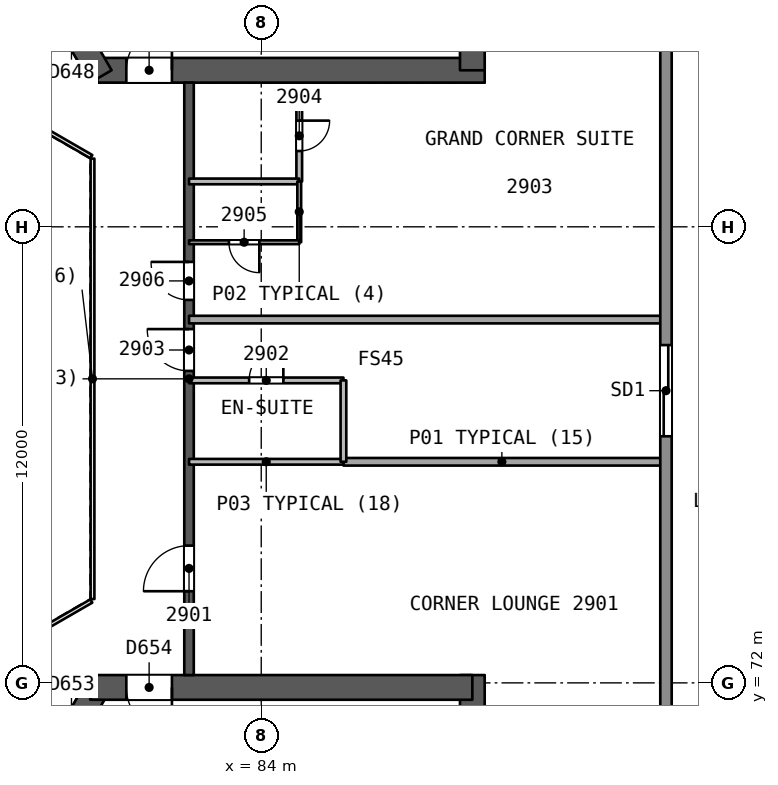
"""IFC4 building model, lengths in metres.
Left out: names, types, materials, properties, quantities, classifications, styles, units other than length and angle.
Written with IfcOpenShell. Run it as: python <this file> out.ifc"""

import sys

from ifc_helpers import new_model, si_unit, direction, frame, frame_2d, origin, place, context, subcontext, project, spatial, rectangle, extrude, element, fill, save


model = new_model("IFC4")
c1 = context("Model", 3, precision=1e-05, world=origin(), true_north=direction((0.0, 1.0)))
c2 = subcontext(c1, "Body", "Model", "MODEL_VIEW")
j1 = project(units=[si_unit("LENGTHUNIT", "METRE"), si_unit("PLANEANGLEUNIT", "RADIAN")], contexts=[c1])
p1 = place(None, origin())
s1 = spatial("IfcSite", under=j1, at=p1, CompositionType="ELEMENT")
p2 = place(p1, origin())
s2 = spatial("IfcBuilding", under=s1, at=p2, CompositionType="ELEMENT")
p3 = place(p2, frame((0.0, 0.0, 121.6)))
s3 = spatial("IfcBuildingStorey", under=s2, at=p3, CompositionType="ELEMENT", Elevation=121.6)
p4 = place(p3, frame((79.688, 88.119, 0.0), z_axis=(0.0, 0.0, 1.0), x_axis=(1.0, 0.0, 0.0)))
e1 = element("IfcWall", 1, at=p4, inside=s3, PredefinedType="SHEAR", context=c2, shape_type="SweptSolid", body=[
    extrude(rectangle(XDim=10.192, YDim=0.65, at=frame_2d((5.096, 0.0))), origin(), (0.0, 0.0, 1.0), 3.7),
])
p5 = place(p4, frame((0.762, 0.0, 0.0)))
e2 = element("IfcOpeningElement", 2, at=p5, cuts=e1, PredefinedType="OPENING", context=c2, shape_type="SweptSolid", body=[
    extrude(rectangle(XDim=1.2, YDim=2.1, at=frame_2d((0.6, 1.05))), frame((0.0, 0.335, 0.0), z_axis=(0.0, -1.0, 0.0), x_axis=(1.0, 0.0, 0.0)), (0.0, 0.0, 1.0), 0.671),
])
p6 = place(p3, frame((89.555, 88.119, 0.0), z_axis=(0.0, 0.0, 1.0), x_axis=(0.0, 1.0, 0.0)))
e3 = element("IfcWall", 3, at=p6, inside=s3, PredefinedType="SHEAR", context=c2, shape_type="SweptSolid", body=[
    extrude(rectangle(XDim=14.009, YDim=0.65, at=frame_2d((7.004, 0.0))), origin(), (0.0, 0.0, 1.0), 3.7),
])
p7 = place(p3, frame((74.754, 96.665, 0.0), z_axis=(0.0, 0.0, 1.0), x_axis=(0.500011799426, -0.866018591275, 0.0)))
e4 = element("IfcWall", 4, at=p7, inside=s3, PredefinedType="SHEAR", context=c2, shape_type="SweptSolid", body=[
    extrude(rectangle(XDim=10.055, YDim=0.65, at=frame_2d((5.027, 0.0))), origin(), (0.0, 0.0, 1.0), 3.7),
])
p8 = place(p7, frame((7.905, 0.0, 0.0)))
e5 = element("IfcOpeningElement", 5, at=p8, cuts=e4, PredefinedType="OPENING", context=c2, shape_type="SweptSolid", body=[
    extrude(rectangle(XDim=1.2, YDim=2.1, at=frame_2d((0.6, 1.05))), frame((0.0, 0.335, 0.0), z_axis=(0.0, -1.0, 0.0), x_axis=(1.0, 0.0, 0.0)), (0.0, 0.0, 1.0), 0.671),
])
p9 = place(p3, frame((79.688, 71.881, 0.0), z_axis=(0.0, 0.0, 1.0), x_axis=(-0.49999822179, -0.866026430432, 0.0)))
e6 = element("IfcWall", 6, at=p9, inside=s3, PredefinedType="SHEAR", context=c2, shape_type="SweptSolid", body=[
    extrude(rectangle(XDim=10.192, YDim=0.65, at=frame_2d((5.096, 0.0))), origin(), (0.0, 0.0, 1.0), 3.7),
])
p10 = place(p9, frame((0.762, 0.0, 0.0)))
e7 = element("IfcOpeningElement", 7, at=p10, cuts=e6, PredefinedType="OPENING", context=c2, shape_type="SweptSolid", body=[
    extrude(rectangle(XDim=1.2, YDim=2.1, at=frame_2d((0.6, 1.05))), frame((0.0, 0.335, 0.0), z_axis=(0.0, -1.0, 0.0), x_axis=(1.0, 0.0, 0.0)), (0.0, 0.0, 1.0), 0.671),
])
p11 = place(p3, frame((89.555, 58.06, 0.0), z_axis=(0.0, 0.0, 1.0), x_axis=(0.0, 1.0, 0.0)))
e8 = element("IfcWall", 8, at=p11, inside=s3, PredefinedType="SHEAR", context=c2, shape_type="SweptSolid", body=[
    extrude(rectangle(XDim=14.146, YDim=0.65, at=frame_2d((7.073, 0.0))), origin(), (0.0, 0.0, 1.0), 3.7),
])
p12 = place(p3, frame((89.555, 71.881, 0.0), z_axis=(0.0, 0.0, 1.0), x_axis=(-1.0, 0.0, 0.0)))
e9 = element("IfcWall", 9, at=p12, inside=s3, PredefinedType="SHEAR", context=c2, shape_type="SweptSolid", body=[
    extrude(rectangle(XDim=10.055, YDim=0.65, at=frame_2d((5.027, 0.0))), origin(), (0.0, 0.0, 1.0), 3.7),
])
p13 = place(p12, frame((7.905, 0.0, 0.0)))
e10 = element("IfcOpeningElement", 10, at=p13, cuts=e9, PredefinedType="OPENING", context=c2, shape_type="SweptSolid", body=[
    extrude(rectangle(XDim=1.2, YDim=2.1, at=frame_2d((0.6, 1.05))), frame((0.0, 0.335, 0.0), z_axis=(0.0, -1.0, 0.0), x_axis=(1.0, 0.0, 0.0)), (0.0, 0.0, 1.0), 0.671),
])
p14 = place(p3, frame((82.1, 72.206, 0.0), z_axis=(0.0, 0.0, 1.0), x_axis=(0.0, 1.0, 0.0)))
e11 = element("IfcWall", 11, at=p14, inside=s3, PredefinedType="SHEAR", context=c2, shape_type="SweptSolid", body=[
    extrude(rectangle(XDim=15.588, YDim=0.25, at=frame_2d((7.794, 0.0))), origin(), (0.0, 0.0, 1.0), 3.25),
])
p15 = place(p14, frame((2.206, 0.0, 0.0)))
e12 = element("IfcOpeningElement", 12, at=p15, cuts=e11, PredefinedType="OPENING", context=c2, shape_type="SweptSolid", body=[
    extrude(rectangle(XDim=1.2, YDim=2.4, at=frame_2d((0.6, 1.2))), frame((0.0, 0.135, 0.0), z_axis=(0.0, -1.0, 0.0), x_axis=(1.0, 0.0, 0.0)), (0.0, 0.0, 1.0), 0.271),
])
p16 = place(p14, frame((8.003, 0.0, 0.0)))
e13 = element("IfcOpeningElement", 13, at=p16, cuts=e11, PredefinedType="OPENING", context=c2, shape_type="SweptSolid", body=[
    extrude(rectangle(XDim=1.1, YDim=2.1, at=frame_2d((0.55, 1.05))), frame((0.0, 0.135, 0.0), z_axis=(0.0, -1.0, 0.0), x_axis=(1.0, 0.0, 0.0)), (0.0, 0.0, 1.0), 0.271),
])
p17 = place(p14, frame((9.871, 0.0, 0.0)))
e14 = element("IfcOpeningElement", 14, at=p17, cuts=e11, PredefinedType="OPENING", context=c2, shape_type="SweptSolid", body=[
    extrude(rectangle(XDim=1.0, YDim=2.1, at=frame_2d((0.5, 1.05))), frame((0.0, 0.135, 0.0), z_axis=(0.0, -1.0, 0.0), x_axis=(1.0, 0.0, 0.0)), (0.0, 0.0, 1.0), 0.271),
])
p18 = place(p3, frame((94.502, 77.818, 0.0), z_axis=(0.0, 0.0, 1.0), x_axis=(-1.0, 0.0, 0.0)))
e15 = element("IfcWall", 15, at=p18, inside=s3, PredefinedType="PARTITIONING", context=c2, shape_type="SweptSolid", body=[
    extrude(rectangle(XDim=8.339, YDim=0.2, at=frame_2d((4.169, 0.0))), origin(), (0.0, 0.0, 1.0), 3.25),
])
p19 = place(p3, frame((86.163, 77.818, 0.0), z_axis=(0.0, 0.0, 1.0), x_axis=(-1.0, 0.0, 0.0)))
e16 = element("IfcWall", 16, at=p19, inside=s3, PredefinedType="PARTITIONING", context=c2, shape_type="SweptSolid", body=[
    extrude(rectangle(XDim=4.063, YDim=0.15, at=frame_2d((2.031, 0.0))), origin(), (0.0, 0.0, 1.0), 3.25),
])
p20 = place(p3, frame((82.1, 79.959, 0.0), z_axis=(0.0, 0.0, 1.0), x_axis=(1.0, 0.0, 0.0)))
e17 = element("IfcWall", 17, at=p20, inside=s3, PredefinedType="PARTITIONING", context=c2, shape_type="SweptSolid", body=[
    extrude(rectangle(XDim=4.063, YDim=0.15, at=frame_2d((2.031, 0.0))), origin(), (0.0, 0.0, 1.0), 3.25),
])
p21 = place(p20, frame((1.582, 0.0, 0.0)))
e18 = element("IfcOpeningElement", 18, at=p21, cuts=e17, PredefinedType="OPENING", context=c2, shape_type="SweptSolid", body=[
    extrude(rectangle(XDim=0.9, YDim=2.1, at=frame_2d((0.45, 1.05))), frame((0.0, 0.085, 0.0), z_axis=(0.0, -1.0, 0.0), x_axis=(1.0, 0.0, 0.0)), (0.0, 0.0, 1.0), 0.171),
])
p22 = place(p3, frame((86.163, 79.959, 0.0), z_axis=(0.0, 0.0, 1.0), x_axis=(0.0, -1.0, 0.0)))
e19 = element("IfcWall", 19, at=p22, inside=s3, PredefinedType="PARTITIONING", context=c2, shape_type="SweptSolid", body=[
    extrude(rectangle(XDim=2.141, YDim=0.15, at=frame_2d((1.071, 0.0))), origin(), (0.0, 0.0, 1.0), 3.25),
])
p23 = place(p3, frame((94.502, 81.559, 0.0), z_axis=(0.0, 0.0, 1.0), x_axis=(-1.0, 0.0, 0.0)))
e20 = element("IfcWall", 20, at=p23, inside=s3, PredefinedType="PARTITIONING", context=c2, shape_type="SweptSolid", body=[
    extrude(rectangle(XDim=12.402, YDim=0.2, at=frame_2d((6.201, 0.0))), origin(), (0.0, 0.0, 1.0), 3.25),
])
p24 = place(p3, frame((85.0, 87.595, 0.0), z_axis=(0.0, 0.0, 1.0), x_axis=(0.0, -1.0, 0.0)))
e21 = element("IfcWall", 21, at=p24, inside=s3, PredefinedType="PARTITIONING", context=c2, shape_type="SweptSolid", body=[
    extrude(rectangle(XDim=2.401, YDim=0.15, at=frame_2d((1.2, 0.0))), origin(), (0.0, 0.0, 1.0), 3.25),
])
p25 = place(p24, frame((0.801, 0.0, 0.0)))
e22 = element("IfcOpeningElement", 22, at=p25, cuts=e21, PredefinedType="OPENING", context=c2, shape_type="SweptSolid", body=[
    extrude(rectangle(XDim=0.8, YDim=2.1, at=frame_2d((0.4, 1.05))), frame((0.0, 0.085, 0.0), z_axis=(0.0, -1.0, 0.0), x_axis=(1.0, 0.0, 0.0)), (0.0, 0.0, 1.0), 0.171),
])
p26 = place(p3, frame((85.0, 85.194, 0.0), z_axis=(0.0, 0.0, 1.0), x_axis=(0.0, -1.0, 0.0)))
e23 = element("IfcWall", 23, at=p26, inside=s3, PredefinedType="PARTITIONING", context=c2, shape_type="SweptSolid", body=[
    extrude(rectangle(XDim=1.6, YDim=0.1, at=frame_2d((0.8, 0.0))), origin(), (0.0, 0.0, 1.0), 3.25),
])
p27 = place(p3, frame((85.0, 83.594, 0.0), z_axis=(0.0, 0.0, 1.0), x_axis=(-1.0, 0.0, 0.0)))
e24 = element("IfcWall", 24, at=p27, inside=s3, PredefinedType="PARTITIONING", context=c2, shape_type="SweptSolid", body=[
    extrude(rectangle(XDim=2.9, YDim=0.1, at=frame_2d((1.45, 0.0))), origin(), (0.0, 0.0, 1.0), 3.25),
])
p28 = place(p27, frame((1.05, 0.0, 0.0)))
e25 = element("IfcOpeningElement", 25, at=p28, cuts=e24, PredefinedType="OPENING", context=c2, shape_type="SweptSolid", body=[
    extrude(rectangle(XDim=0.8, YDim=2.1, at=frame_2d((0.4, 1.05))), frame((0.0, 0.061, 0.0), z_axis=(0.0, -1.0, 0.0), x_axis=(1.0, 0.0, 0.0)), (0.0, 0.0, 1.0), 0.121),
])
p29 = place(p3, frame((82.1, 85.194, 0.0), z_axis=(0.0, 0.0, 1.0), x_axis=(1.0, 0.0, 0.0)))
e26 = element("IfcWall", 26, at=p29, inside=s3, PredefinedType="PARTITIONING", context=c2, shape_type="SweptSolid", body=[
    extrude(rectangle(XDim=2.9, YDim=0.15, at=frame_2d((1.45, 0.0))), origin(), (0.0, 0.0, 1.0), 3.25),
])
p30 = place(p3, frame((94.651, 108.254, 0.0), z_axis=(0.0, 0.0, 1.0), x_axis=(0.0, -1.0, 0.0)))
e27 = element("IfcWall", 27, at=p30, inside=s3, PredefinedType="SOLIDWALL", context=c2, shape_type="SweptSolid", body=[
    extrude(rectangle(XDim=56.508, YDim=0.3, at=frame_2d((28.254, 0.0))), origin(), (0.0, 0.0, 1.0), 3.25),
])
p31 = place(p30, frame((27.366, 0.0, 0.0)))
e28 = element("IfcOpeningElement", 28, at=p31, cuts=e27, PredefinedType="OPENING", context=c2, shape_type="SweptSolid", body=[
    extrude(rectangle(XDim=2.4, YDim=2.4, at=frame_2d((1.2, 1.2))), frame((0.0, 0.161, 0.0), z_axis=(0.0, -1.0, 0.0), x_axis=(1.0, 0.0, 0.0)), (0.0, 0.0, 1.0), 0.321),
])
p32 = place(p30, frame((42.316, 0.0, 0.0)))
e29 = element("IfcOpeningElement", 29, at=p32, cuts=e27, PredefinedType="OPENING", context=c2, shape_type="SweptSolid", body=[
    extrude(rectangle(XDim=2.4, YDim=2.4, at=frame_2d((1.2, 1.2))), frame((0.0, 0.161, 0.0), z_axis=(0.0, -1.0, 0.0), x_axis=(1.0, 0.0, 0.0)), (0.0, 0.0, 1.0), 0.321),
])
p33 = place(p30, frame((12.104, 0.0, 0.0)))
e30 = element("IfcOpeningElement", 30, at=p33, cuts=e27, PredefinedType="OPENING", context=c2, shape_type="SweptSolid", body=[
    extrude(rectangle(XDim=2.4, YDim=2.4, at=frame_2d((1.2, 1.2))), frame((0.0, 0.161, 0.0), z_axis=(0.0, -1.0, 0.0), x_axis=(1.0, 0.0, 0.0)), (0.0, 0.0, 1.0), 0.321),
])
p34 = place(p3, frame((40.706, 82.891, 0.0), z_axis=(0.0, 0.0, 1.0), x_axis=(0.866024855185, 0.5000009502, 0.0)))
e31 = element("IfcWall", 31, at=p34, inside=s3, PredefinedType="SOLIDWALL", context=c2, shape_type="SweptSolid", body=[
    extrude(rectangle(XDim=56.508, YDim=0.3, at=frame_2d((28.254, 0.0))), origin(), (0.0, 0.0, 1.0), 3.25),
])
p35 = place(p34, frame((27.054, 0.0, 0.0)))
e32 = element("IfcOpeningElement", 32, at=p35, cuts=e31, PredefinedType="OPENING", context=c2, shape_type="SweptSolid", body=[
    extrude(rectangle(XDim=2.4, YDim=2.4, at=frame_2d((1.2, 1.2))), frame((0.0, 0.161, 0.0), z_axis=(0.0, -1.0, 0.0), x_axis=(1.0, 0.0, 0.0)), (0.0, 0.0, 1.0), 0.321),
])
p36 = place(p34, frame((32.822, 0.0, 0.0)))
e33 = element("IfcOpeningElement", 33, at=p36, cuts=e31, PredefinedType="OPENING", context=c2, shape_type="SweptSolid", body=[
    extrude(rectangle(XDim=2.4, YDim=2.4, at=frame_2d((1.2, 1.2))), frame((0.0, 0.161, 0.0), z_axis=(0.0, -1.0, 0.0), x_axis=(1.0, 0.0, 0.0)), (0.0, 0.0, 1.0), 0.321),
])
p37 = place(p34, frame((43.875, 0.0, 0.0)))
e34 = element("IfcOpeningElement", 34, at=p37, cuts=e31, PredefinedType="OPENING", context=c2, shape_type="SweptSolid", body=[
    extrude(rectangle(XDim=2.4, YDim=2.4, at=frame_2d((1.2, 1.2))), frame((0.0, 0.161, 0.0), z_axis=(0.0, -1.0, 0.0), x_axis=(1.0, 0.0, 0.0)), (0.0, 0.0, 1.0), 0.321),
])
p38 = place(p34, frame((21.286, 0.0, 0.0)))
e35 = element("IfcOpeningElement", 35, at=p38, cuts=e31, PredefinedType="OPENING", context=c2, shape_type="SweptSolid", body=[
    extrude(rectangle(XDim=2.4, YDim=2.4, at=frame_2d((1.2, 1.2))), frame((0.0, 0.161, 0.0), z_axis=(0.0, -1.0, 0.0), x_axis=(1.0, 0.0, 0.0)), (0.0, 0.0, 1.0), 0.321),
])
p39 = place(p34, frame((10.251, 0.0, 0.0)))
e36 = element("IfcOpeningElement", 36, at=p39, cuts=e31, PredefinedType="OPENING", context=c2, shape_type="SweptSolid", body=[
    extrude(rectangle(XDim=2.4, YDim=2.4, at=frame_2d((1.2, 1.2))), frame((0.0, 0.161, 0.0), z_axis=(0.0, -1.0, 0.0), x_axis=(1.0, 0.0, 0.0)), (0.0, 0.0, 1.0), 0.321),
])
p40 = place(p3, frame((89.643, 48.855, 0.0), z_axis=(0.0, 0.0, 1.0), x_axis=(-0.866024855185, 0.5000009502, 0.0)))
e37 = element("IfcWall", 37, at=p40, inside=s3, PredefinedType="SOLIDWALL", context=c2, shape_type="SweptSolid", body=[
    extrude(rectangle(XDim=56.508, YDim=0.3, at=frame_2d((28.254, 0.0))), origin(), (0.0, 0.0, 1.0), 3.25),
])
p41 = place(p40, frame((42.783, 0.0, 0.0)))
e38 = element("IfcOpeningElement", 38, at=p41, cuts=e37, PredefinedType="OPENING", context=c2, shape_type="SweptSolid", body=[
    extrude(rectangle(XDim=2.4, YDim=2.4, at=frame_2d((1.2, 1.2))), frame((0.0, 0.161, 0.0), z_axis=(0.0, -1.0, 0.0), x_axis=(1.0, 0.0, 0.0)), (0.0, 0.0, 1.0), 0.321),
])
p42 = place(p40, frame((11.948, 0.0, 0.0)))
e39 = element("IfcOpeningElement", 39, at=p42, cuts=e37, PredefinedType="OPENING", context=c2, shape_type="SweptSolid", body=[
    extrude(rectangle(XDim=2.4, YDim=2.4, at=frame_2d((1.2, 1.2))), frame((0.0, 0.161, 0.0), z_axis=(0.0, -1.0, 0.0), x_axis=(1.0, 0.0, 0.0)), (0.0, 0.0, 1.0), 0.321),
])
p43 = place(p40, frame((27.677, 0.0, 0.0)))
e40 = element("IfcOpeningElement", 40, at=p43, cuts=e37, PredefinedType="OPENING", context=c2, shape_type="SweptSolid", body=[
    extrude(rectangle(XDim=2.4, YDim=2.4, at=frame_2d((1.2, 1.2))), frame((0.0, 0.161, 0.0), z_axis=(0.0, -1.0, 0.0), x_axis=(1.0, 0.0, 0.0)), (0.0, 0.0, 1.0), 0.321),
])
p44 = place(p3, frame((79.56, 74.206, 0.0), z_axis=(0.0, 0.0, 1.0), x_axis=(0.0, 1.0, 0.0)))
e41 = element("IfcWall", 41, at=p44, inside=s3, PredefinedType="PARTITIONING", context=c2, shape_type="SweptSolid", body=[
    extrude(rectangle(XDim=11.588, YDim=0.1, at=frame_2d((5.794, 0.0))), origin(), (0.0, 0.0, 1.0), 3.25),
])
for number, where, z_axis, x_axis in (
    (42, (79.53, 85.846, 0.0), (0.0, 0.0, 1.0), (-0.866, 0.5, 0.0)),
    (43, (77.798, 73.154, 0.0), (0.0, 0.0, 1.0), (0.866, 0.5, 0.0)),
):
    element("IfcWall", number, at=place(p3, frame(where, z_axis=z_axis, x_axis=x_axis)), inside=s3, PredefinedType="PARTITIONING", context=c2, shape_type="SweptSolid", body=[
        extrude(rectangle(XDim=2.0, YDim=0.1, at=frame_2d((1.0, 0.0))), origin(), (0.0, 0.0, 1.0), 3.25),
    ])
p45 = place(p15, origin())
e44 = element("IfcDoor", 44, at=p45, inside=s3, OperationType="SINGLE_SWING_LEFT", PredefinedType="NOTDEFINED", context=c2, shape_type="SweptSolid", body=[
    extrude(rectangle(XDim=1.2, YDim=2.4, at=frame_2d((0.6, 1.2))), frame((0.0, 0.025, 0.0), z_axis=(0.0, -1.0, 0.0), x_axis=(1.0, 0.0, 0.0)), (0.0, 0.0, 1.0), 0.05),
])
fill(e12, e44)
p46 = place(p21, origin())
e45 = element("IfcDoor", 45, at=p46, inside=s3, OperationType="SINGLE_SWING_RIGHT", PredefinedType="NOTDEFINED", context=c2, shape_type="SweptSolid", body=[
    extrude(rectangle(XDim=0.9, YDim=2.1, at=frame_2d((0.45, 1.05))), frame((0.0, 0.025, 0.0), z_axis=(0.0, -1.0, 0.0), x_axis=(1.0, 0.0, 0.0)), (0.0, 0.0, 1.0), 0.05),
])
fill(e18, e45)
p47 = place(p16, origin())
e46 = element("IfcDoor", 46, at=p47, inside=s3, OperationType="SINGLE_SWING_RIGHT", PredefinedType="NOTDEFINED", context=c2, shape_type="SweptSolid", body=[
    extrude(rectangle(XDim=1.1, YDim=2.1, at=frame_2d((0.55, 1.05))), frame((0.0, 0.025, 0.0), z_axis=(0.0, -1.0, 0.0), x_axis=(1.0, 0.0, 0.0)), (0.0, 0.0, 1.0), 0.05),
])
fill(e13, e46)
p48 = place(p25, origin())
e47 = element("IfcDoor", 47, at=p48, inside=s3, OperationType="SINGLE_SWING_LEFT", PredefinedType="NOTDEFINED", context=c2, shape_type="SweptSolid", body=[
    extrude(rectangle(XDim=0.8, YDim=2.1, at=frame_2d((0.4, 1.05))), frame((0.0, 0.025, 0.0), z_axis=(0.0, -1.0, 0.0), x_axis=(1.0, 0.0, 0.0)), (0.0, 0.0, 1.0), 0.05),
])
fill(e22, e47)
p49 = place(p28, origin())
e48 = element("IfcDoor", 48, at=p49, inside=s3, OperationType="SINGLE_SWING_LEFT", PredefinedType="NOTDEFINED", context=c2, shape_type="SweptSolid", body=[
    extrude(rectangle(XDim=0.8, YDim=2.1, at=frame_2d((0.4, 1.05))), frame((0.0, 0.025, 0.0), z_axis=(0.0, -1.0, 0.0), x_axis=(1.0, 0.0, 0.0)), (0.0, 0.0, 1.0), 0.05),
])
fill(e25, e48)
p50 = place(p17, origin())
e49 = element("IfcDoor", 49, at=p50, inside=s3, OperationType="SINGLE_SWING_RIGHT", PredefinedType="NOTDEFINED", context=c2, shape_type="SweptSolid", body=[
    extrude(rectangle(XDim=1.0, YDim=2.1, at=frame_2d((0.5, 1.05))), frame((0.0, 0.025, 0.0), z_axis=(0.0, -1.0, 0.0), x_axis=(1.0, 0.0, 0.0)), (0.0, 0.0, 1.0), 0.05),
])
fill(e14, e49)
p51 = place(p31, origin())
e50 = element("IfcDoor", 50, at=p51, inside=s3, OperationType="SLIDING_TO_LEFT", PredefinedType="NOTDEFINED", context=c2, shape_type="SweptSolid", body=[
    extrude(rectangle(XDim=2.4, YDim=2.4, at=frame_2d((1.2, 1.2))), frame((0.0, 0.025, 0.0), z_axis=(0.0, -1.0, 0.0), x_axis=(1.0, 0.0, 0.0)), (0.0, 0.0, 1.0), 0.05),
])
fill(e28, e50)
p52 = place(p5, origin())
e51 = element("IfcDoor", 51, at=p52, inside=s3, OperationType="SINGLE_SWING_RIGHT", PredefinedType="NOTDEFINED", context=c2, shape_type="SweptSolid", body=[
    extrude(rectangle(XDim=1.2, YDim=2.1, at=frame_2d((0.6, 1.05))), frame((0.0, 0.025, 0.0), z_axis=(0.0, -1.0, 0.0), x_axis=(1.0, 0.0, 0.0)), (0.0, 0.0, 1.0), 0.05),
])
fill(e2, e51)
p53 = place(p13, origin())
e52 = element("IfcDoor", 52, at=p53, inside=s3, OperationType="SINGLE_SWING_LEFT", PredefinedType="NOTDEFINED", context=c2, shape_type="SweptSolid", body=[
    extrude(rectangle(XDim=1.2, YDim=2.1, at=frame_2d((0.6, 1.05))), frame((0.0, 0.025, 0.0), z_axis=(0.0, -1.0, 0.0), x_axis=(1.0, 0.0, 0.0)), (0.0, 0.0, 1.0), 0.05),
])
fill(e10, e52)
save(model, sys.argv[1])
